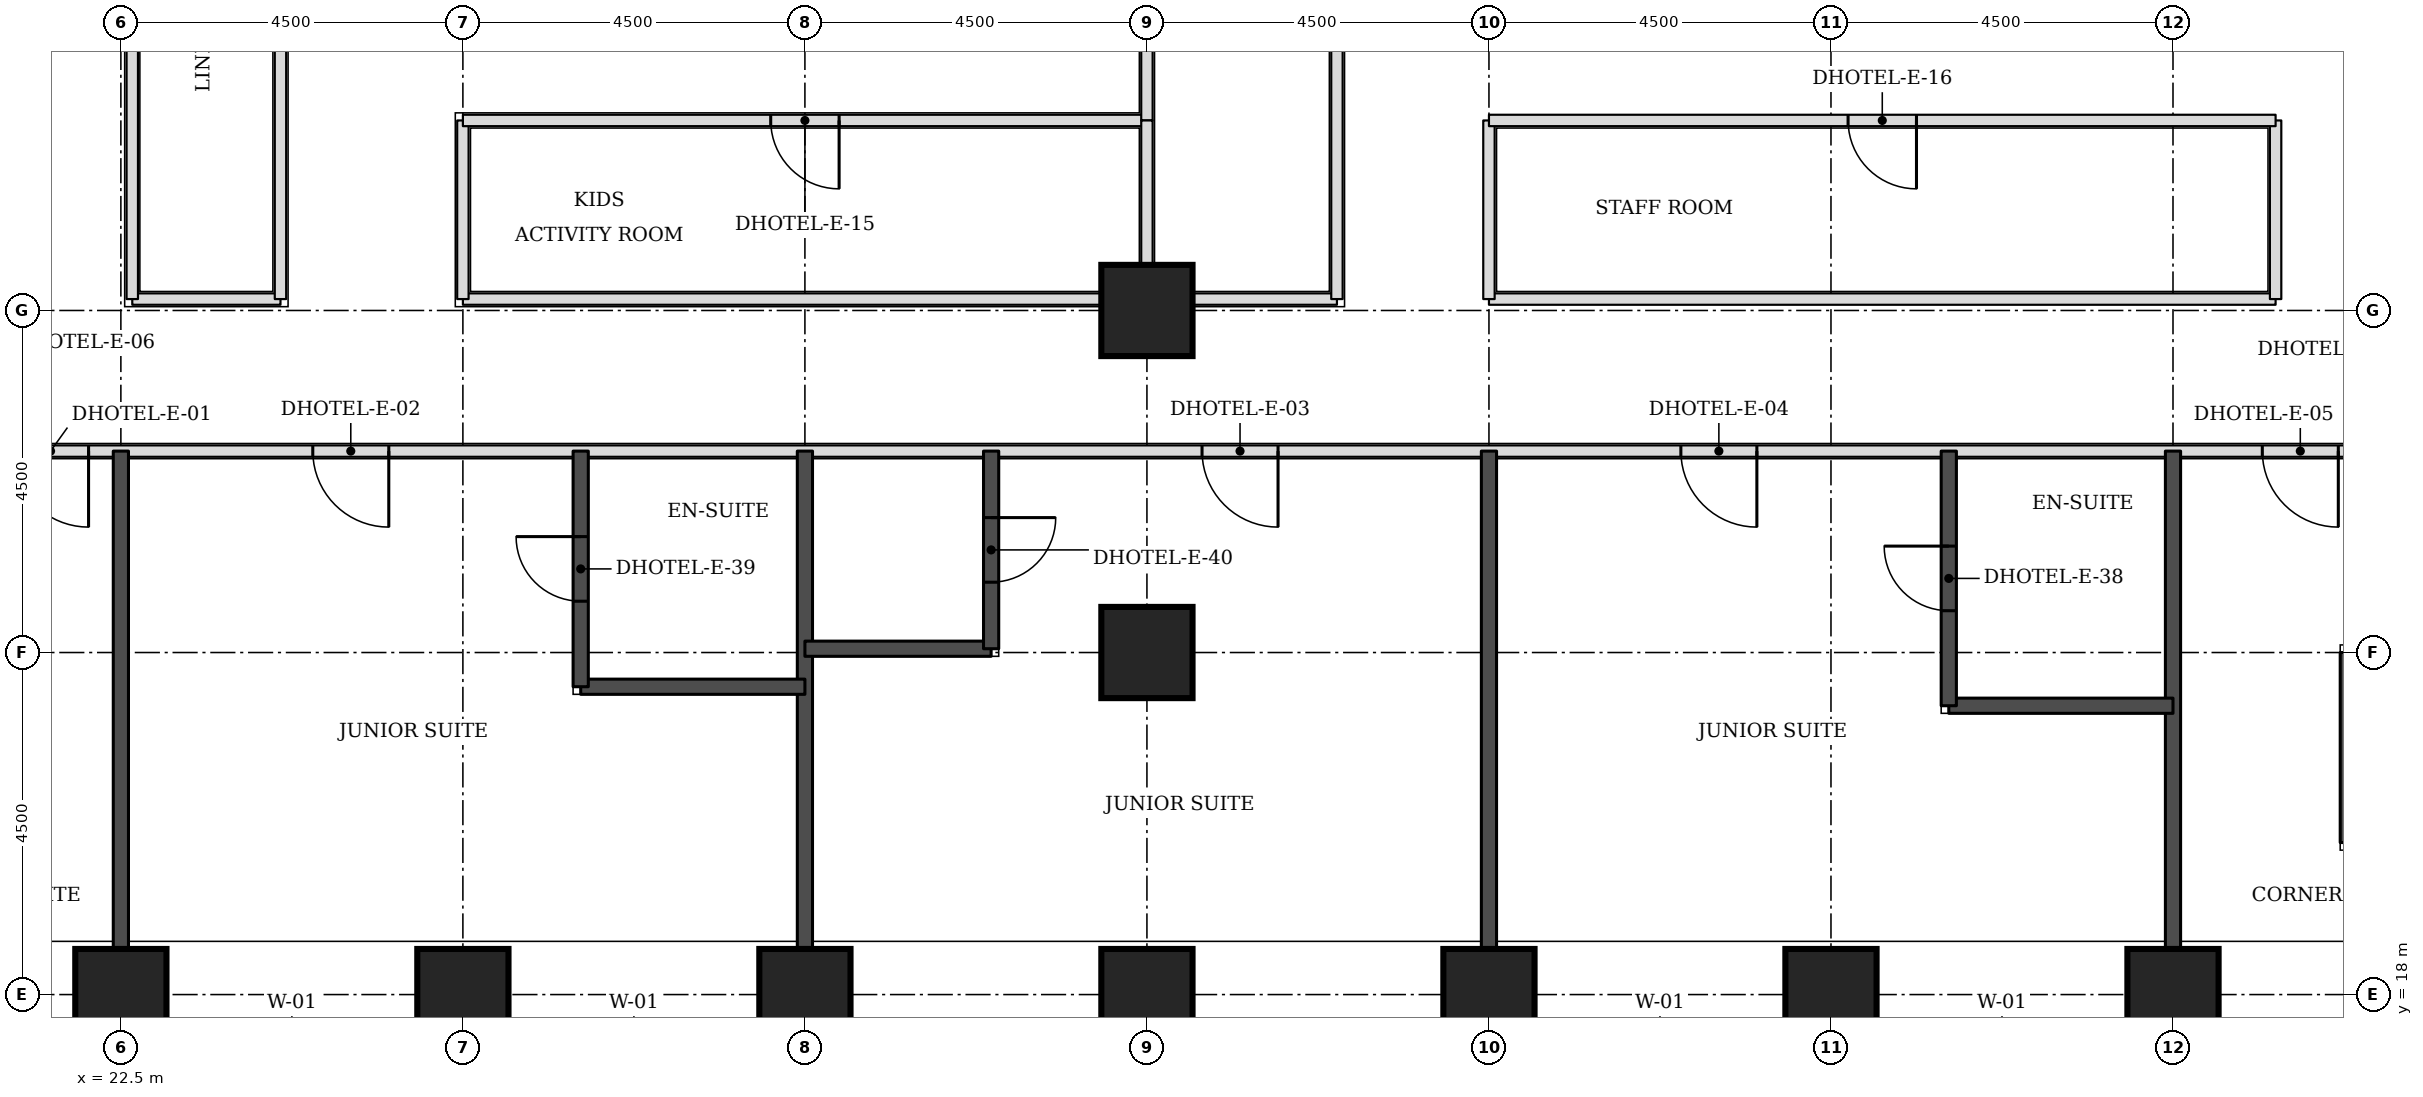
"""IFC4 building model, lengths in metres.
Left out: names, types, materials, properties, quantities, classifications, styles, units other than length and angle.
Written with IfcOpenShell. Run it as: python <this file> out.ifc"""

import sys

from ifc_helpers import new_model, si_unit, direction, frame, frame_2d, origin, origin_2d, place, context, subcontext, project, spatial, rectangle, extrude, element, fill, save


model = new_model("IFC4")
c1 = context("Model", 3, precision=1e-05, world=origin(), true_north=direction((0.0, 1.0)))
c2 = subcontext(c1, "Body", "Model", "MODEL_VIEW")
j1 = project(units=[si_unit("LENGTHUNIT", "METRE"), si_unit("PLANEANGLEUNIT", "RADIAN")], contexts=[c1])
p1 = place(None, origin())
s1 = spatial("IfcSite", under=j1, at=p1, CompositionType="ELEMENT")
p2 = place(p1, origin())
s2 = spatial("IfcBuilding", under=s1, at=p2, CompositionType="ELEMENT")
p3 = place(p2, frame((0.0, 0.0, 62.7)))
s3 = spatial("IfcBuildingStorey", under=s2, at=p3, CompositionType="ELEMENT", Elevation=62.7)
for number, where, z_axis, x_axis in (
    (1, (22.5, 18.0, 0.0), (0.0, 0.0, 1.0), (1.0, 0.0, 0.0)),
    (2, (27.0, 18.0, 0.0), (0.0, 0.0, 1.0), (1.0, 0.0, 0.0)),
    (3, (31.5, 18.0, 0.0), (0.0, 0.0, 1.0), (1.0, 0.0, 0.0)),
    (4, (36.0, 18.0, 0.0), (0.0, 0.0, 1.0), (1.0, 0.0, 0.0)),
    (5, (40.5, 18.0, 0.0), (0.0, 0.0, 1.0), (1.0, 0.0, 0.0)),
    (6, (45.0, 18.0, 0.0), (0.0, 0.0, 1.0), (1.0, 0.0, 0.0)),
    (7, (49.5, 18.0, 0.0), (0.0, 0.0, 1.0), (1.0, 0.0, 0.0)),
    (8, (36.0, 22.5, 0.0), (0.0, 0.0, 1.0), (1.0, 0.0, 0.0)),
    (9, (36.0, 27.0, 0.0), (0.0, 0.0, 1.0), (1.0, 0.0, 0.0)),
):
    element("IfcColumn", number, at=place(p3, frame(where, z_axis=z_axis, x_axis=x_axis)), inside=s3, PredefinedType="COLUMN", context=c2, shape_type="SweptSolid", body=[
        extrude(rectangle(XDim=1.2, YDim=1.2, at=origin_2d()), origin(), (0.0, 0.0, 1.0), 3.3),
    ])
p4 = place(p3, frame((20.65, 25.15, 0.0), z_axis=(0.0, 0.0, 1.0), x_axis=(1.0, 0.0, 0.0)))
e10 = element("IfcWall", 10, at=p4, inside=s3, PredefinedType="PARTITIONING", context=c2, shape_type="SweptSolid", body=[
    extrude(rectangle(XDim=32.2, YDim=0.15, at=frame_2d((16.1, 0.0))), origin(), (0.0, 0.0, 1.0), 3.08),
])
p5 = place(p4, frame((4.375, 0.0, 0.0)))
e11 = element("IfcOpeningElement", 11, at=p5, cuts=e10, PredefinedType="OPENING", context=c2, shape_type="SweptSolid", body=[
    extrude(rectangle(XDim=1.0, YDim=2.1, at=frame_2d((0.5, 1.05))), frame((0.0, 0.085, 0.0), z_axis=(0.0, -1.0, 0.0), x_axis=(1.0, 0.0, 0.0)), (0.0, 0.0, 1.0), 0.17),
])
p6 = place(p4, frame((16.075, 0.0, 0.0)))
e12 = element("IfcOpeningElement", 12, at=p6, cuts=e10, PredefinedType="OPENING", context=c2, shape_type="SweptSolid", body=[
    extrude(rectangle(XDim=1.0, YDim=2.1, at=frame_2d((0.5, 1.05))), frame((0.0, 0.085, 0.0), z_axis=(0.0, -1.0, 0.0), x_axis=(1.0, 0.0, 0.0)), (0.0, 0.0, 1.0), 0.17),
])
p7 = place(p4, frame((22.375, 0.0, 0.0)))
e13 = element("IfcOpeningElement", 13, at=p7, cuts=e10, PredefinedType="OPENING", context=c2, shape_type="SweptSolid", body=[
    extrude(rectangle(XDim=1.0, YDim=2.1, at=frame_2d((0.5, 1.05))), frame((0.0, 0.085, 0.0), z_axis=(0.0, -1.0, 0.0), x_axis=(1.0, 0.0, 0.0)), (0.0, 0.0, 1.0), 0.17),
])
p8 = place(p4, frame((0.425, 0.0, 0.0)))
e14 = element("IfcOpeningElement", 14, at=p8, cuts=e10, PredefinedType="OPENING", context=c2, shape_type="SweptSolid", body=[
    extrude(rectangle(XDim=1.0, YDim=2.1, at=frame_2d((0.5, 1.05))), frame((0.0, 0.085, 0.0), z_axis=(0.0, -1.0, 0.0), x_axis=(1.0, 0.0, 0.0)), (0.0, 0.0, 1.0), 0.17),
])
p9 = place(p4, frame((30.025, 0.0, 0.0)))
e15 = element("IfcOpeningElement", 15, at=p9, cuts=e10, PredefinedType="OPENING", context=c2, shape_type="SweptSolid", body=[
    extrude(rectangle(XDim=1.0, YDim=2.1, at=frame_2d((0.5, 1.05))), frame((0.0, 0.085, 0.0), z_axis=(0.0, -1.0, 0.0), x_axis=(1.0, 0.0, 0.0)), (0.0, 0.0, 1.0), 0.17),
])
p10 = place(p3, frame((22.65, 27.15, 0.0), z_axis=(0.0, 0.0, 1.0), x_axis=(1.0, 0.0, 0.0)))
e16 = element("IfcWall", 16, at=p10, inside=s3, PredefinedType="PARTITIONING", context=c2, shape_type="SweptSolid", body=[
    extrude(rectangle(XDim=1.95, YDim=0.15, at=frame_2d((0.975, 0.0))), origin(), (0.0, 0.0, 1.0), 3.08),
])
p11 = place(p3, frame((22.65, 27.15, 0.0), z_axis=(0.0, 0.0, 1.0), x_axis=(0.0, 1.0, 0.0)))
e17 = element("IfcWall", 17, at=p11, inside=s3, PredefinedType="PARTITIONING", context=c2, shape_type="SweptSolid", body=[
    extrude(rectangle(XDim=15.85, YDim=0.15, at=frame_2d((7.925, 0.0))), origin(), (0.0, 0.0, 1.0), 3.08),
])
p12 = place(p11, frame((9.225, 0.0, 0.0)))
e18 = element("IfcOpeningElement", 18, at=p12, cuts=e17, PredefinedType="OPENING", context=c2, shape_type="SweptSolid", body=[
    extrude(rectangle(XDim=0.9, YDim=2.1, at=frame_2d((0.45, 1.05))), frame((0.0, 0.085, 0.0), z_axis=(0.0, -1.0, 0.0), x_axis=(1.0, 0.0, 0.0)), (0.0, 0.0, 1.0), 0.17),
])
p13 = place(p3, frame((24.6, 27.15, 0.0), z_axis=(0.0, 0.0, 1.0), x_axis=(0.0, 1.0, 0.0)))
e19 = element("IfcWall", 19, at=p13, inside=s3, PredefinedType="PARTITIONING", context=c2, shape_type="SweptSolid", body=[
    extrude(rectangle(XDim=13.35, YDim=0.15, at=frame_2d((6.675, 0.0))), origin(), (0.0, 0.0, 1.0), 3.08),
])
p14 = place(p3, frame((27.0, 27.15, 0.0), z_axis=(0.0, 0.0, 1.0), x_axis=(1.0, 0.0, 0.0)))
e20 = element("IfcWall", 20, at=p14, inside=s3, PredefinedType="PARTITIONING", context=c2, shape_type="SweptSolid", body=[
    extrude(rectangle(XDim=11.5, YDim=0.15, at=frame_2d((5.75, 0.0))), origin(), (0.0, 0.0, 1.0), 3.08),
])
p15 = place(p3, frame((27.0, 27.15, 0.0), z_axis=(0.0, 0.0, 1.0), x_axis=(0.0, 1.0, 0.0)))
e21 = element("IfcWall", 21, at=p15, inside=s3, PredefinedType="PARTITIONING", context=c2, shape_type="SweptSolid", body=[
    extrude(rectangle(XDim=2.35, YDim=0.15, at=frame_2d((1.175, 0.0))), origin(), (0.0, 0.0, 1.0), 3.08),
])
p16 = place(p3, frame((38.5, 27.15, 0.0), z_axis=(0.0, 0.0, 1.0), x_axis=(0.0, 1.0, 0.0)))
e22 = element("IfcWall", 22, at=p16, inside=s3, PredefinedType="PARTITIONING", context=c2, shape_type="SweptSolid", body=[
    extrude(rectangle(XDim=13.35, YDim=0.15, at=frame_2d((6.675, 0.0))), origin(), (0.0, 0.0, 1.0), 3.08),
])
p17 = place(p16, frame((6.225, 0.0, 0.0)))
e23 = element("IfcOpeningElement", 23, at=p17, cuts=e22, PredefinedType="OPENING", context=c2, shape_type="SweptSolid", body=[
    extrude(rectangle(XDim=0.9, YDim=2.1, at=frame_2d((0.45, 1.05))), frame((0.0, 0.085, 0.0), z_axis=(0.0, -1.0, 0.0), x_axis=(1.0, 0.0, 0.0)), (0.0, 0.0, 1.0), 0.17),
])
p18 = place(p3, frame((40.5, 27.15, 0.0), z_axis=(0.0, 0.0, 1.0), x_axis=(1.0, 0.0, 0.0)))
e24 = element("IfcWall", 24, at=p18, inside=s3, PredefinedType="PARTITIONING", context=c2, shape_type="SweptSolid", body=[
    extrude(rectangle(XDim=10.35, YDim=0.15, at=frame_2d((5.175, 0.0))), origin(), (0.0, 0.0, 1.0), 3.08),
])
for number, where, z_axis, x_axis in (
    (25, (40.5, 27.15, 0.0), (0.0, 0.0, 1.0), (0.0, 1.0, 0.0)),
    (26, (50.85, 27.15, 0.0), (0.0, 0.0, 1.0), (0.0, 1.0, 0.0)),
):
    element("IfcWall", number, at=place(p3, frame(where, z_axis=z_axis, x_axis=x_axis)), inside=s3, PredefinedType="PARTITIONING", context=c2, shape_type="SweptSolid", body=[
        extrude(rectangle(XDim=2.35, YDim=0.15, at=frame_2d((1.175, 0.0))), origin(), (0.0, 0.0, 1.0), 3.08),
    ])
p19 = place(p3, frame((27.0, 29.5, 0.0), z_axis=(0.0, 0.0, 1.0), x_axis=(1.0, 0.0, 0.0)))
e27 = element("IfcWall", 27, at=p19, inside=s3, PredefinedType="PARTITIONING", context=c2, shape_type="SweptSolid", body=[
    extrude(rectangle(XDim=9.0, YDim=0.15, at=frame_2d((4.5, 0.0))), origin(), (0.0, 0.0, 1.0), 3.08),
])
p20 = place(p19, frame((4.05, 0.0, 0.0)))
e28 = element("IfcOpeningElement", 28, at=p20, cuts=e27, PredefinedType="OPENING", context=c2, shape_type="SweptSolid", body=[
    extrude(rectangle(XDim=0.9, YDim=2.1, at=frame_2d((0.45, 1.05))), frame((0.0, 0.085, 0.0), z_axis=(0.0, -1.0, 0.0), x_axis=(1.0, 0.0, 0.0)), (0.0, 0.0, 1.0), 0.17),
])
p21 = place(p3, frame((36.0, 29.5, 0.0), z_axis=(0.0, 0.0, 1.0), x_axis=(0.0, 1.0, 0.0)))
e29 = element("IfcWall", 29, at=p21, inside=s3, PredefinedType="PARTITIONING", context=c2, shape_type="SweptSolid", body=[
    extrude(rectangle(XDim=1.95, YDim=0.15, at=frame_2d((0.975, 0.0))), origin(), (0.0, 0.0, 1.0), 2.33),
])
p22 = place(p3, frame((40.5, 29.5, 0.0), z_axis=(0.0, 0.0, 1.0), x_axis=(1.0, 0.0, 0.0)))
e30 = element("IfcWall", 30, at=p22, inside=s3, PredefinedType="PARTITIONING", context=c2, shape_type="SweptSolid", body=[
    extrude(rectangle(XDim=10.35, YDim=0.15, at=frame_2d((5.175, 0.0))), origin(), (0.0, 0.0, 1.0), 3.08),
])
p23 = place(p22, frame((4.725, 0.0, 0.0)))
e31 = element("IfcOpeningElement", 31, at=p23, cuts=e30, PredefinedType="OPENING", context=c2, shape_type="SweptSolid", body=[
    extrude(rectangle(XDim=0.9, YDim=2.1, at=frame_2d((0.45, 1.05))), frame((0.0, 0.085, 0.0), z_axis=(0.0, -1.0, 0.0), x_axis=(1.0, 0.0, 0.0)), (0.0, 0.0, 1.0), 0.17),
])
for number, where, z_axis, x_axis in (
    (32, (22.5, 18.6, 0.0), (0.0, 0.0, 1.0), (0.0, 1.0, 0.0)),
    (33, (31.5, 18.6, 0.0), (0.0, 0.0, 1.0), (0.0, 1.0, 0.0)),
    (34, (40.5, 18.6, 0.0), (0.0, 0.0, 1.0), (0.0, 1.0, 0.0)),
    (35, (49.5, 18.6, 0.0), (0.0, 0.0, 1.0), (0.0, 1.0, 0.0)),
):
    element("IfcWall", number, at=place(p3, frame(where, z_axis=z_axis, x_axis=x_axis)), inside=s3, PredefinedType="SOLIDWALL", context=c2, shape_type="SweptSolid", body=[
        extrude(rectangle(XDim=6.55, YDim=0.2, at=frame_2d((3.275, 0.0))), origin(), (0.0, 0.0, 1.0), 3.08),
    ])
p24 = place(p3, frame((51.8, 20.0, 0.0), z_axis=(0.0, 0.0, 1.0), x_axis=(0.0, 1.0, 0.0)))
e36 = element("IfcWall", 36, at=p24, inside=s3, PredefinedType="SOLIDWALL", context=c2, shape_type="SweptSolid", body=[
    extrude(rectangle(XDim=2.5, YDim=0.2, at=frame_2d((1.25, 0.0))), origin(), (0.0, 0.0, 1.0), 3.08),
])
p25 = place(p3, frame((46.55, 21.8, 0.0), z_axis=(0.0, 0.0, 1.0), x_axis=(1.0, 0.0, 0.0)))
e37 = element("IfcWall", 37, at=p25, inside=s3, PredefinedType="SOLIDWALL", context=c2, shape_type="SweptSolid", body=[
    extrude(rectangle(XDim=2.95, YDim=0.2, at=frame_2d((1.475, 0.0))), origin(), (0.0, 0.0, 1.0), 3.08),
])
p26 = place(p3, frame((46.55, 21.8, 0.0), z_axis=(0.0, 0.0, 1.0), x_axis=(0.0, 1.0, 0.0)))
e38 = element("IfcWall", 38, at=p26, inside=s3, PredefinedType="SOLIDWALL", context=c2, shape_type="SweptSolid", body=[
    extrude(rectangle(XDim=3.35, YDim=0.2, at=frame_2d((1.675, 0.0))), origin(), (0.0, 0.0, 1.0), 3.08),
])
p27 = place(p26, frame((1.25, 0.0, 0.0)))
e39 = element("IfcOpeningElement", 39, at=p27, cuts=e38, PredefinedType="OPENING", context=c2, shape_type="SweptSolid", body=[
    extrude(rectangle(XDim=0.85, YDim=2.1, at=frame_2d((0.425, 1.05))), frame((0.0, 0.11, 0.0), z_axis=(0.0, -1.0, 0.0), x_axis=(1.0, 0.0, 0.0)), (0.0, 0.0, 1.0), 0.22),
])
p28 = place(p3, frame((28.55, 22.05, 0.0), z_axis=(0.0, 0.0, 1.0), x_axis=(1.0, 0.0, 0.0)))
e40 = element("IfcWall", 40, at=p28, inside=s3, PredefinedType="SOLIDWALL", context=c2, shape_type="SweptSolid", body=[
    extrude(rectangle(XDim=2.95, YDim=0.2, at=frame_2d((1.475, 0.0))), origin(), (0.0, 0.0, 1.0), 3.08),
])
p29 = place(p3, frame((28.55, 22.05, 0.0), z_axis=(0.0, 0.0, 1.0), x_axis=(0.0, 1.0, 0.0)))
e41 = element("IfcWall", 41, at=p29, inside=s3, PredefinedType="SOLIDWALL", context=c2, shape_type="SweptSolid", body=[
    extrude(rectangle(XDim=3.1, YDim=0.2, at=frame_2d((1.55, 0.0))), origin(), (0.0, 0.0, 1.0), 3.08),
])
p30 = place(p29, frame((1.125, 0.0, 0.0)))
e42 = element("IfcOpeningElement", 42, at=p30, cuts=e41, PredefinedType="OPENING", context=c2, shape_type="SweptSolid", body=[
    extrude(rectangle(XDim=0.85, YDim=2.1, at=frame_2d((0.425, 1.05))), frame((0.0, 0.11, 0.0), z_axis=(0.0, -1.0, 0.0), x_axis=(1.0, 0.0, 0.0)), (0.0, 0.0, 1.0), 0.22),
])
p31 = place(p3, frame((31.5, 22.55, 0.0), z_axis=(0.0, 0.0, 1.0), x_axis=(1.0, 0.0, 0.0)))
e43 = element("IfcWall", 43, at=p31, inside=s3, PredefinedType="SOLIDWALL", context=c2, shape_type="SweptSolid", body=[
    extrude(rectangle(XDim=2.45, YDim=0.2, at=frame_2d((1.225, 0.0))), origin(), (0.0, 0.0, 1.0), 3.08),
])
p32 = place(p3, frame((33.95, 22.55, 0.0), z_axis=(0.0, 0.0, 1.0), x_axis=(0.0, 1.0, 0.0)))
e44 = element("IfcWall", 44, at=p32, inside=s3, PredefinedType="SOLIDWALL", context=c2, shape_type="SweptSolid", body=[
    extrude(rectangle(XDim=2.6, YDim=0.2, at=frame_2d((1.3, 0.0))), origin(), (0.0, 0.0, 1.0), 3.08),
])
p33 = place(p32, frame((0.875, 0.0, 0.0)))
e45 = element("IfcOpeningElement", 45, at=p33, cuts=e44, PredefinedType="OPENING", context=c2, shape_type="SweptSolid", body=[
    extrude(rectangle(XDim=0.85, YDim=2.1, at=frame_2d((0.425, 1.05))), frame((0.0, 0.11, 0.0), z_axis=(0.0, -1.0, 0.0), x_axis=(1.0, 0.0, 0.0)), (0.0, 0.0, 1.0), 0.22),
])
p34 = place(p3, frame((36.0, 27.15, 0.0), z_axis=(0.0, 0.0, 1.0), x_axis=(0.0, 1.0, 0.0)))
e46 = element("IfcWall", 46, at=p34, inside=s3, PredefinedType="PARTITIONING", context=c2, shape_type="SweptSolid", body=[
    extrude(rectangle(XDim=2.35, YDim=0.15, at=frame_2d((1.175, 0.0))), origin(), (0.0, 0.0, 1.0), 2.33),
])
p35 = place(p5, frame((1.0, 0.0, 0.0), z_axis=(0.0, 0.0, 1.0), x_axis=(-1.0, 0.0, 0.0)))
e47 = element("IfcDoor", 47, at=p35, inside=s3, OperationType="SINGLE_SWING_LEFT", PredefinedType="DOOR", context=c2, shape_type="SweptSolid", body=[
    extrude(rectangle(XDim=1.0, YDim=2.1, at=frame_2d((0.5, 1.05))), frame((0.0, 0.025, 0.0), z_axis=(0.0, -1.0, 0.0), x_axis=(1.0, 0.0, 0.0)), (0.0, 0.0, 1.0), 0.05),
])
fill(e11, e47)
p36 = place(p30, origin())
e48 = element("IfcDoor", 48, at=p36, inside=s3, OperationType="SINGLE_SWING_RIGHT", PredefinedType="DOOR", context=c2, shape_type="SweptSolid", body=[
    extrude(rectangle(XDim=0.85, YDim=2.1, at=frame_2d((0.425, 1.05))), frame((0.0, 0.025, 0.0), z_axis=(0.0, -1.0, 0.0), x_axis=(1.0, 0.0, 0.0)), (0.0, 0.0, 1.0), 0.05),
])
fill(e42, e48)
p37 = place(p6, frame((1.0, 0.0, 0.0), z_axis=(0.0, 0.0, 1.0), x_axis=(-1.0, 0.0, 0.0)))
e49 = element("IfcDoor", 49, at=p37, inside=s3, OperationType="SINGLE_SWING_LEFT", PredefinedType="DOOR", context=c2, shape_type="SweptSolid", body=[
    extrude(rectangle(XDim=1.0, YDim=2.1, at=frame_2d((0.5, 1.05))), frame((0.0, 0.025, 0.0), z_axis=(0.0, -1.0, 0.0), x_axis=(1.0, 0.0, 0.0)), (0.0, 0.0, 1.0), 0.05),
])
fill(e12, e49)
p38 = place(p33, frame((0.85, 0.0, 0.0), z_axis=(0.0, 0.0, 1.0), x_axis=(-1.0, 0.0, 0.0)))
e50 = element("IfcDoor", 50, at=p38, inside=s3, OperationType="SINGLE_SWING_LEFT", PredefinedType="DOOR", context=c2, shape_type="SweptSolid", body=[
    extrude(rectangle(XDim=0.85, YDim=2.1, at=frame_2d((0.425, 1.05))), frame((0.0, 0.025, 0.0), z_axis=(0.0, -1.0, 0.0), x_axis=(1.0, 0.0, 0.0)), (0.0, 0.0, 1.0), 0.05),
])
fill(e45, e50)
p39 = place(p7, frame((1.0, 0.0, 0.0), z_axis=(0.0, 0.0, 1.0), x_axis=(-1.0, 0.0, 0.0)))
e51 = element("IfcDoor", 51, at=p39, inside=s3, OperationType="SINGLE_SWING_LEFT", PredefinedType="DOOR", context=c2, shape_type="SweptSolid", body=[
    extrude(rectangle(XDim=1.0, YDim=2.1, at=frame_2d((0.5, 1.05))), frame((0.0, 0.025, 0.0), z_axis=(0.0, -1.0, 0.0), x_axis=(1.0, 0.0, 0.0)), (0.0, 0.0, 1.0), 0.05),
])
fill(e13, e51)
p40 = place(p27, origin())
e52 = element("IfcDoor", 52, at=p40, inside=s3, OperationType="SINGLE_SWING_RIGHT", PredefinedType="DOOR", context=c2, shape_type="SweptSolid", body=[
    extrude(rectangle(XDim=0.85, YDim=2.1, at=frame_2d((0.425, 1.05))), frame((0.0, 0.025, 0.0), z_axis=(0.0, -1.0, 0.0), x_axis=(1.0, 0.0, 0.0)), (0.0, 0.0, 1.0), 0.05),
])
fill(e39, e52)
p41 = place(p8, frame((1.0, 0.0, 0.0), z_axis=(0.0, 0.0, 1.0), x_axis=(-1.0, 0.0, 0.0)))
e53 = element("IfcDoor", 53, at=p41, inside=s3, OperationType="SINGLE_SWING_LEFT", PredefinedType="DOOR", context=c2, shape_type="SweptSolid", body=[
    extrude(rectangle(XDim=1.0, YDim=2.1, at=frame_2d((0.5, 1.05))), frame((0.0, 0.025, 0.0), z_axis=(0.0, -1.0, 0.0), x_axis=(1.0, 0.0, 0.0)), (0.0, 0.0, 1.0), 0.05),
])
fill(e14, e53)
p42 = place(p9, frame((1.0, 0.0, 0.0), z_axis=(0.0, 0.0, 1.0), x_axis=(-1.0, 0.0, 0.0)))
e54 = element("IfcDoor", 54, at=p42, inside=s3, OperationType="SINGLE_SWING_LEFT", PredefinedType="DOOR", context=c2, shape_type="SweptSolid", body=[
    extrude(rectangle(XDim=1.0, YDim=2.1, at=frame_2d((0.5, 1.05))), frame((0.0, 0.025, 0.0), z_axis=(0.0, -1.0, 0.0), x_axis=(1.0, 0.0, 0.0)), (0.0, 0.0, 1.0), 0.05),
])
fill(e15, e54)
p43 = place(p20, frame((0.9, 0.0, 0.0), z_axis=(0.0, 0.0, 1.0), x_axis=(-1.0, 0.0, 0.0)))
e55 = element("IfcDoor", 55, at=p43, inside=s3, OperationType="SINGLE_SWING_LEFT", PredefinedType="DOOR", context=c2, shape_type="SweptSolid", body=[
    extrude(rectangle(XDim=0.9, YDim=2.1, at=frame_2d((0.45, 1.05))), frame((0.0, 0.025, 0.0), z_axis=(0.0, -1.0, 0.0), x_axis=(1.0, 0.0, 0.0)), (0.0, 0.0, 1.0), 0.05),
])
fill(e28, e55)
p44 = place(p23, frame((0.9, 0.0, 0.0), z_axis=(0.0, 0.0, 1.0), x_axis=(-1.0, 0.0, 0.0)))
e56 = element("IfcDoor", 56, at=p44, inside=s3, OperationType="SINGLE_SWING_LEFT", PredefinedType="DOOR", context=c2, shape_type="SweptSolid", body=[
    extrude(rectangle(XDim=0.9, YDim=2.1, at=frame_2d((0.45, 1.05))), frame((0.0, 0.025, 0.0), z_axis=(0.0, -1.0, 0.0), x_axis=(1.0, 0.0, 0.0)), (0.0, 0.0, 1.0), 0.05),
])
fill(e31, e56)
save(model, sys.argv[1])
